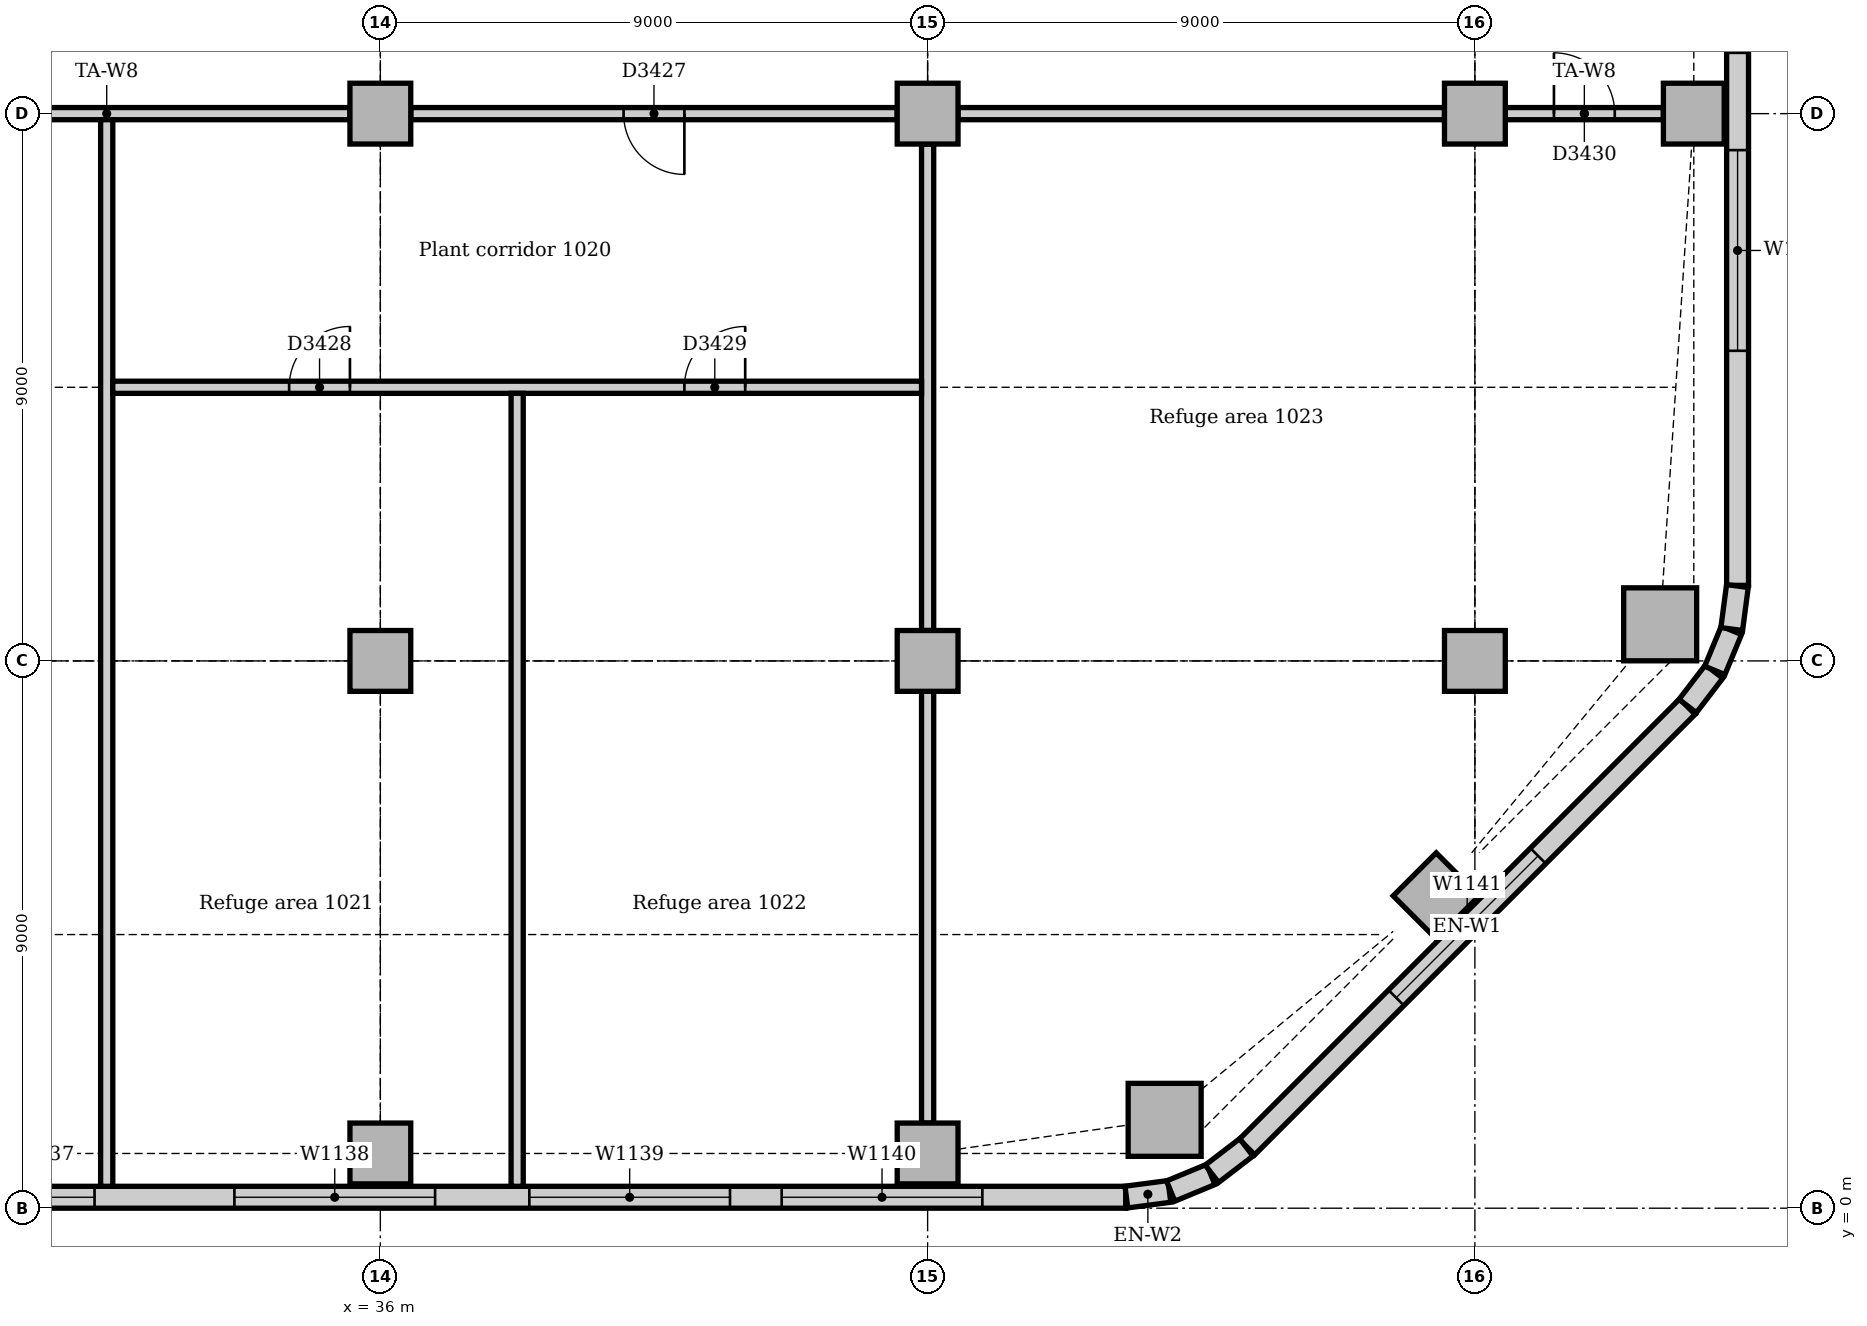
"""IFC4 building model, lengths in metres.
Left out: names, types, materials, properties, quantities, classifications, styles, units other than length and angle.
Written with IfcOpenShell. Run it as: python <this file> out.ifc"""

import sys

from ifc_helpers import new_model, si_unit, direction, frame, frame_2d, origin, origin_2d, place, context, subcontext, project, spatial, rectangle, extrude, element, fill, save


model = new_model("IFC4")
c1 = context("Model", 3, precision=1e-05, world=origin(), true_north=direction((0.0, 1.0)))
c2 = subcontext(c1, "Body", "Model", "MODEL_VIEW")
j1 = project(units=[si_unit("LENGTHUNIT", "METRE"), si_unit("PLANEANGLEUNIT", "RADIAN")], contexts=[c1])
p1 = place(None, origin())
s1 = spatial("IfcSite", under=j1, at=p1, CompositionType="ELEMENT")
p2 = place(p1, origin())
s2 = spatial("IfcBuilding", under=s1, at=p2, CompositionType="ELEMENT")
p3 = place(p2, frame((0.0, 0.0, 46.0)))
s3 = spatial("IfcBuildingStorey", under=s2, at=p3, CompositionType="ELEMENT", Elevation=46.0)
for number, where, z_axis, x_axis in (
    (1, (48.898, 1.453, 0.0), (0.0, 0.0, 1.0), (1.0, 0.0, 0.0)),
    (2, (57.047, 9.602, 0.0), (0.0, 0.0, 1.0), (1.0, 0.0, 0.0)),
):
    element("IfcColumn", number, at=place(p3, frame(where, z_axis=z_axis, x_axis=x_axis)), inside=s3, PredefinedType="COLUMN", context=c2, shape_type="SweptSolid", body=[
        extrude(rectangle(XDim=1.2, YDim=1.2, at=origin_2d()), origin(), (0.0, 0.0, 1.0), 4.85),
    ])
for number, where, z_axis, x_axis in (
    (3, (36.0, 0.9, 0.0), (0.0, 0.0, 1.0), (1.0, 0.0, 0.0)),
    (4, (45.0, 0.9, 0.0), (0.0, 0.0, 1.0), (1.0, 0.0, 0.0)),
    (5, (53.364, 5.136, 0.0), (0.0, 0.0, 1.0), (0.707, 0.707, 0.0)),
    (6, (57.6, 18.0, 0.0), (0.0, 0.0, 1.0), (1.0, 0.0, 0.0)),
    (7, (36.0, 9.0, 0.0), (0.0, 0.0, 1.0), (1.0, 0.0, 0.0)),
    (8, (36.0, 18.0, 0.0), (0.0, 0.0, 1.0), (1.0, 0.0, 0.0)),
    (9, (45.0, 9.0, 0.0), (0.0, 0.0, 1.0), (1.0, 0.0, 0.0)),
    (10, (45.0, 18.0, 0.0), (0.0, 0.0, 1.0), (1.0, 0.0, 0.0)),
    (11, (54.0, 9.0, 0.0), (0.0, 0.0, 1.0), (1.0, 0.0, 0.0)),
    (12, (54.0, 18.0, 0.0), (0.0, 0.0, 1.0), (1.0, 0.0, 0.0)),
):
    element("IfcColumn", number, at=place(p3, frame(where, z_axis=z_axis, x_axis=x_axis)), inside=s3, PredefinedType="COLUMN", context=c2, shape_type="SweptSolid", body=[
        extrude(rectangle(XDim=1.0, YDim=1.0, at=origin_2d()), origin(), (0.0, 0.0, 1.0), 4.85),
    ])
p4 = place(p3, frame((4.243, 0.18, 0.0), z_axis=(0.0, 0.0, 1.0), x_axis=(1.0, 0.0, 0.0)))
e13 = element("IfcWall", 13, at=p4, inside=s3, PredefinedType="STANDARD", context=c2, shape_type="SweptSolid", body=[
    extrude(rectangle(XDim=44.015, YDim=0.36, at=frame_2d((22.007, 0.0))), origin(), (0.0, 0.0, 1.0), 4.85),
])
p5 = place(p4, frame((2.439, 0.0, 0.9)))
e14 = element("IfcOpeningElement", 14, at=p5, cuts=e13, PredefinedType="OPENING", context=c2, shape_type="SweptSolid", body=[
    extrude(rectangle(XDim=1.8, YDim=2.2, at=frame_2d((0.9, 1.1))), frame((0.0, 0.19, 0.0), z_axis=(0.0, -1.0, 0.0), x_axis=(1.0, 0.0, 0.0)), (0.0, 0.0, 1.0), 0.38),
])
p6 = place(p4, frame((7.257, 0.0, 0.9)))
e15 = element("IfcOpeningElement", 15, at=p6, cuts=e13, PredefinedType="OPENING", context=c2, shape_type="SweptSolid", body=[
    extrude(rectangle(XDim=1.8, YDim=2.2, at=frame_2d((0.9, 1.1))), frame((0.0, 0.19, 0.0), z_axis=(0.0, -1.0, 0.0), x_axis=(1.0, 0.0, 0.0)), (0.0, 0.0, 1.0), 0.38),
])
p7 = place(p4, frame((11.439, 0.0, 0.9)))
e16 = element("IfcOpeningElement", 16, at=p7, cuts=e13, PredefinedType="OPENING", context=c2, shape_type="SweptSolid", body=[
    extrude(rectangle(XDim=1.8, YDim=2.2, at=frame_2d((0.9, 1.1))), frame((0.0, 0.19, 0.0), z_axis=(0.0, -1.0, 0.0), x_axis=(1.0, 0.0, 0.0)), (0.0, 0.0, 1.0), 0.38),
])
p8 = place(p4, frame((15.857, 0.0, 0.9)))
e17 = element("IfcOpeningElement", 17, at=p8, cuts=e13, PredefinedType="OPENING", context=c2, shape_type="SweptSolid", body=[
    extrude(rectangle(XDim=3.3, YDim=2.2, at=frame_2d((1.65, 1.1))), frame((0.0, 0.19, 0.0), z_axis=(0.0, -1.0, 0.0), x_axis=(1.0, 0.0, 0.0)), (0.0, 0.0, 1.0), 0.38),
])
p9 = place(p4, frame((20.357, 0.0, 0.9)))
e18 = element("IfcOpeningElement", 18, at=p9, cuts=e13, PredefinedType="OPENING", context=c2, shape_type="SweptSolid", body=[
    extrude(rectangle(XDim=3.3, YDim=2.2, at=frame_2d((1.65, 1.1))), frame((0.0, 0.19, 0.0), z_axis=(0.0, -1.0, 0.0), x_axis=(1.0, 0.0, 0.0)), (0.0, 0.0, 1.0), 0.38),
])
p10 = place(p4, frame((25.257, 0.0, 0.9)))
e19 = element("IfcOpeningElement", 19, at=p10, cuts=e13, PredefinedType="OPENING", context=c2, shape_type="SweptSolid", body=[
    extrude(rectangle(XDim=1.8, YDim=2.2, at=frame_2d((0.9, 1.1))), frame((0.0, 0.19, 0.0), z_axis=(0.0, -1.0, 0.0), x_axis=(1.0, 0.0, 0.0)), (0.0, 0.0, 1.0), 0.38),
])
p11 = place(p4, frame((29.357, 0.0, 0.9)))
e20 = element("IfcOpeningElement", 20, at=p11, cuts=e13, PredefinedType="OPENING", context=c2, shape_type="SweptSolid", body=[
    extrude(rectangle(XDim=3.3, YDim=2.2, at=frame_2d((1.65, 1.1))), frame((0.0, 0.19, 0.0), z_axis=(0.0, -1.0, 0.0), x_axis=(1.0, 0.0, 0.0)), (0.0, 0.0, 1.0), 0.38),
])
p12 = place(p4, frame((34.207, 0.0, 0.9)))
e21 = element("IfcOpeningElement", 21, at=p12, cuts=e13, PredefinedType="OPENING", context=c2, shape_type="SweptSolid", body=[
    extrude(rectangle(XDim=3.3, YDim=2.2, at=frame_2d((1.65, 1.1))), frame((0.0, 0.19, 0.0), z_axis=(0.0, -1.0, 0.0), x_axis=(1.0, 0.0, 0.0)), (0.0, 0.0, 1.0), 0.38),
])
p13 = place(p4, frame((38.357, 0.0, 0.9)))
e22 = element("IfcOpeningElement", 22, at=p13, cuts=e13, PredefinedType="OPENING", context=c2, shape_type="SweptSolid", body=[
    extrude(rectangle(XDim=3.3, YDim=2.2, at=frame_2d((1.65, 1.1))), frame((0.0, 0.19, 0.0), z_axis=(0.0, -1.0, 0.0), x_axis=(1.0, 0.0, 0.0)), (0.0, 0.0, 1.0), 0.38),
])
p14 = place(p3, frame((50.251, 1.006, 0.0), z_axis=(0.0, 0.0, 1.0), x_axis=(0.707106781187, 0.707106781187, 0.0)))
e23 = element("IfcWall", 23, at=p14, inside=s3, PredefinedType="STANDARD", context=c2, shape_type="SweptSolid", body=[
    extrude(rectangle(XDim=10.243, YDim=0.36, at=frame_2d((5.121, 0.0))), origin(), (0.0, 0.0, 1.0), 4.85),
])
p15 = place(p14, frame((3.471, 0.0, 0.9)))
e24 = element("IfcOpeningElement", 24, at=p15, cuts=e23, PredefinedType="OPENING", context=c2, shape_type="SweptSolid", body=[
    extrude(rectangle(XDim=3.3, YDim=2.2, at=frame_2d((1.65, 1.1))), frame((0.0, 0.19, 0.0), z_axis=(0.0, -1.0, 0.0), x_axis=(1.0, 0.0, 0.0)), (0.0, 0.0, 1.0), 0.38),
])
p16 = place(p3, frame((58.32, 10.243, 0.0), z_axis=(0.0, 0.0, 1.0), x_axis=(0.0, 1.0, 0.0)))
e25 = element("IfcWall", 25, at=p16, inside=s3, PredefinedType="STANDARD", context=c2, shape_type="SweptSolid", body=[
    extrude(rectangle(XDim=24.515, YDim=0.36, at=frame_2d((12.257, 0.0))), origin(), (0.0, 0.0, 1.0), 4.85),
])
p17 = place(p16, frame((3.857, 0.0, 0.9)))
e26 = element("IfcOpeningElement", 26, at=p17, cuts=e25, PredefinedType="OPENING", context=c2, shape_type="SweptSolid", body=[
    extrude(rectangle(XDim=3.3, YDim=2.2, at=frame_2d((1.65, 1.1))), frame((0.0, 0.19, 0.0), z_axis=(0.0, -1.0, 0.0), x_axis=(1.0, 0.0, 0.0)), (0.0, 0.0, 1.0), 0.38),
])
p18 = place(p16, frame((8.757, 0.0, 0.9)))
e27 = element("IfcOpeningElement", 27, at=p18, cuts=e25, PredefinedType="OPENING", context=c2, shape_type="SweptSolid", body=[
    extrude(rectangle(XDim=1.8, YDim=2.2, at=frame_2d((0.9, 1.1))), frame((0.0, 0.19, 0.0), z_axis=(0.0, -1.0, 0.0), x_axis=(1.0, 0.0, 0.0)), (0.0, 0.0, 1.0), 0.38),
])
p19 = place(p16, frame((12.557, 0.0, 0.9)))
e28 = element("IfcOpeningElement", 28, at=p19, cuts=e25, PredefinedType="OPENING", context=c2, shape_type="SweptSolid", body=[
    extrude(rectangle(XDim=3.3, YDim=2.2, at=frame_2d((1.65, 1.1))), frame((0.0, 0.19, 0.0), z_axis=(0.0, -1.0, 0.0), x_axis=(1.0, 0.0, 0.0)), (0.0, 0.0, 1.0), 0.38),
])
p20 = place(p16, frame((17.357, 0.0, 0.9)))
e29 = element("IfcOpeningElement", 29, at=p20, cuts=e25, PredefinedType="OPENING", context=c2, shape_type="SweptSolid", body=[
    extrude(rectangle(XDim=3.3, YDim=2.2, at=frame_2d((1.65, 1.1))), frame((0.0, 0.19, 0.0), z_axis=(0.0, -1.0, 0.0), x_axis=(1.0, 0.0, 0.0)), (0.0, 0.0, 1.0), 0.38),
])
for number, where, z_axis, x_axis in (
    (30, (48.269, 0.183, 0.0), (0.0, 0.0, 1.0), (0.991, 0.131, 0.0)),
    (31, (48.997, 0.282, 0.0), (0.0, 0.0, 1.0), (0.924, 0.383, 0.0)),
):
    element("IfcWall", number, at=place(p3, frame(where, z_axis=z_axis, x_axis=x_axis)), inside=s3, PredefinedType="STANDARD", context=c2, shape_type="SweptSolid", body=[
        extrude(rectangle(XDim=0.713, YDim=0.36, at=frame_2d((0.356, 0.0))), origin(), (0.0, 0.0, 1.0), 4.85),
    ])
for number, where, z_axis, x_axis in (
    (32, (49.675, 0.566, 0.0), (0.0, 0.0, 1.0), (0.793, 0.609, 0.0)),
    (33, (57.5, 8.259, 0.0), (0.0, 0.0, 1.0), (0.609, 0.793, 0.0)),
):
    element("IfcWall", number, at=place(p3, frame(where, z_axis=z_axis, x_axis=x_axis)), inside=s3, PredefinedType="STANDARD", context=c2, shape_type="SweptSolid", body=[
        extrude(rectangle(XDim=0.713, YDim=0.36, at=frame_2d((0.357, 0.0))), origin(), (0.0, 0.0, 1.0), 4.85),
    ])
for number, where, z_axis, x_axis in (
    (34, (57.945, 8.844, 0.0), (0.0, 0.0, 1.0), (0.383, 0.924, 0.0)),
    (35, (58.224, 9.524, 0.0), (0.0, 0.0, 1.0), (0.131, 0.991, 0.0)),
):
    element("IfcWall", number, at=place(p3, frame(where, z_axis=z_axis, x_axis=x_axis)), inside=s3, PredefinedType="STANDARD", context=c2, shape_type="SweptSolid", body=[
        extrude(rectangle(XDim=0.713, YDim=0.36, at=frame_2d((0.356, 0.0))), origin(), (0.0, 0.0, 1.0), 4.85),
    ])
p21 = place(p3, frame((54.5, 18.0, 0.0), z_axis=(0.0, 0.0, 1.0), x_axis=(1.0, 0.0, 0.0)))
e36 = element("IfcWall", 36, at=p21, inside=s3, PredefinedType="PARTITIONING", context=c2, shape_type="SweptSolid", body=[
    extrude(rectangle(XDim=2.6, YDim=0.2, at=frame_2d((1.3, 0.0))), origin(), (0.0, 0.0, 1.0), 4.602),
])
p22 = place(p21, frame((0.8, 0.0, 0.0)))
e37 = element("IfcOpeningElement", 37, at=p22, cuts=e36, PredefinedType="OPENING", context=c2, shape_type="SweptSolid", body=[
    extrude(rectangle(XDim=1.0, YDim=2.1, at=frame_2d((0.5, 1.05))), frame((0.0, 0.11, 0.0), z_axis=(0.0, -1.0, 0.0), x_axis=(1.0, 0.0, 0.0)), (0.0, 0.0, 1.0), 0.22),
])
p23 = place(p3, frame((45.5, 18.0, 0.0), z_axis=(0.0, 0.0, 1.0), x_axis=(1.0, 0.0, 0.0)))
e38 = element("IfcWall", 38, at=p23, inside=s3, PredefinedType="PARTITIONING", context=c2, shape_type="SweptSolid", body=[
    extrude(rectangle(XDim=8.0, YDim=0.2, at=frame_2d((4.0, 0.0))), origin(), (0.0, 0.0, 1.0), 4.15),
])
p24 = place(p3, frame((36.5, 18.0, 0.0), z_axis=(0.0, 0.0, 1.0), x_axis=(1.0, 0.0, 0.0)))
e39 = element("IfcWall", 39, at=p24, inside=s3, PredefinedType="PARTITIONING", context=c2, shape_type="SweptSolid", body=[
    extrude(rectangle(XDim=8.0, YDim=0.2, at=frame_2d((4.0, 0.0))), origin(), (0.0, 0.0, 1.0), 4.15),
])
p25 = place(p24, frame((3.5, 0.0, 0.0)))
e40 = element("IfcOpeningElement", 40, at=p25, cuts=e39, PredefinedType="OPENING", context=c2, shape_type="SweptSolid", body=[
    extrude(rectangle(XDim=1.0, YDim=2.1, at=frame_2d((0.5, 1.05))), frame((0.0, 0.11, 0.0), z_axis=(0.0, -1.0, 0.0), x_axis=(1.0, 0.0, 0.0)), (0.0, 0.0, 1.0), 0.22),
])
p26 = place(p3, frame((27.5, 18.0, 0.0), z_axis=(0.0, 0.0, 1.0), x_axis=(1.0, 0.0, 0.0)))
e41 = element("IfcWall", 41, at=p26, inside=s3, PredefinedType="PARTITIONING", context=c2, shape_type="SweptSolid", body=[
    extrude(rectangle(XDim=8.0, YDim=0.2, at=frame_2d((4.0, 0.0))), origin(), (0.0, 0.0, 1.0), 4.15),
])
p27 = place(p3, frame((31.5, 0.36, 0.0), z_axis=(0.0, 0.0, 1.0), x_axis=(0.0, 1.0, 0.0)))
e42 = element("IfcWall", 42, at=p27, inside=s3, PredefinedType="PARTITIONING", context=c2, shape_type="SweptSolid", body=[
    extrude(rectangle(XDim=17.54, YDim=0.2, at=frame_2d((8.77, 0.0))), origin(), (0.0, 0.0, 1.0), 4.85),
])
p28 = place(p3, frame((45.0, 1.4, 0.0), z_axis=(0.0, 0.0, 1.0), x_axis=(0.0, 1.0, 0.0)))
e43 = element("IfcWall", 43, at=p28, inside=s3, PredefinedType="PARTITIONING", context=c2, shape_type="SweptSolid", body=[
    extrude(rectangle(XDim=7.1, YDim=0.2, at=frame_2d((3.55, 0.0))), origin(), (0.0, 0.0, 1.0), 4.158),
])
p29 = place(p3, frame((45.0, 9.5, 0.0), z_axis=(0.0, 0.0, 1.0), x_axis=(0.0, 1.0, 0.0)))
e44 = element("IfcWall", 44, at=p29, inside=s3, PredefinedType="PARTITIONING", context=c2, shape_type="SweptSolid", body=[
    extrude(rectangle(XDim=8.0, YDim=0.2, at=frame_2d((4.0, 0.0))), origin(), (0.0, 0.0, 1.0), 4.158),
])
p30 = place(p3, frame((31.6, 13.5, 0.0), z_axis=(0.0, 0.0, 1.0), x_axis=(1.0, 0.0, 0.0)))
e45 = element("IfcWall", 45, at=p30, inside=s3, PredefinedType="PARTITIONING", context=c2, shape_type="SweptSolid", body=[
    extrude(rectangle(XDim=13.3, YDim=0.2, at=frame_2d((6.65, 0.0))), origin(), (0.0, 0.0, 1.0), 4.35),
])
p31 = place(p30, frame((2.9, 0.0, 0.0)))
e46 = element("IfcOpeningElement", 46, at=p31, cuts=e45, PredefinedType="OPENING", context=c2, shape_type="SweptSolid", body=[
    extrude(rectangle(XDim=1.0, YDim=2.1, at=frame_2d((0.5, 1.05))), frame((0.0, 0.11, 0.0), z_axis=(0.0, -1.0, 0.0), x_axis=(1.0, 0.0, 0.0)), (0.0, 0.0, 1.0), 0.22),
])
p32 = place(p30, frame((9.4, 0.0, 0.0)))
e47 = element("IfcOpeningElement", 47, at=p32, cuts=e45, PredefinedType="OPENING", context=c2, shape_type="SweptSolid", body=[
    extrude(rectangle(XDim=1.0, YDim=2.1, at=frame_2d((0.5, 1.05))), frame((0.0, 0.11, 0.0), z_axis=(0.0, -1.0, 0.0), x_axis=(1.0, 0.0, 0.0)), (0.0, 0.0, 1.0), 0.22),
])
p33 = place(p3, frame((38.25, 0.36, 0.0), z_axis=(0.0, 0.0, 1.0), x_axis=(0.0, 1.0, 0.0)))
e48 = element("IfcWall", 48, at=p33, inside=s3, PredefinedType="PARTITIONING", context=c2, shape_type="SweptSolid", body=[
    extrude(rectangle(XDim=13.04, YDim=0.2, at=frame_2d((6.52, 0.0))), origin(), (0.0, 0.0, 1.0), 4.85),
])
p34 = place(p10, origin())
e49 = element("IfcWindow", 49, at=p34, inside=s3, PartitioningType="SINGLE_PANEL", PredefinedType="WINDOW", context=c2, shape_type="SweptSolid", body=[
    extrude(rectangle(XDim=1.8, YDim=2.2, at=frame_2d((0.9, 1.1))), frame((0.0, 0.13, 0.0), z_axis=(0.0, -1.0, 0.0), x_axis=(1.0, 0.0, 0.0)), (0.0, 0.0, 1.0), 0.06),
])
fill(e19, e49)
p35 = place(p11, origin())
e50 = element("IfcWindow", 50, at=p35, inside=s3, PartitioningType="SINGLE_PANEL", PredefinedType="WINDOW", context=c2, shape_type="SweptSolid", body=[
    extrude(rectangle(XDim=3.3, YDim=2.2, at=frame_2d((1.65, 1.1))), frame((0.0, 0.13, 0.0), z_axis=(0.0, -1.0, 0.0), x_axis=(1.0, 0.0, 0.0)), (0.0, 0.0, 1.0), 0.06),
])
fill(e20, e50)
p36 = place(p12, origin())
e51 = element("IfcWindow", 51, at=p36, inside=s3, PartitioningType="SINGLE_PANEL", PredefinedType="WINDOW", context=c2, shape_type="SweptSolid", body=[
    extrude(rectangle(XDim=3.3, YDim=2.2, at=frame_2d((1.65, 1.1))), frame((0.0, 0.13, 0.0), z_axis=(0.0, -1.0, 0.0), x_axis=(1.0, 0.0, 0.0)), (0.0, 0.0, 1.0), 0.06),
])
fill(e21, e51)
p37 = place(p13, origin())
e52 = element("IfcWindow", 52, at=p37, inside=s3, PartitioningType="SINGLE_PANEL", PredefinedType="WINDOW", context=c2, shape_type="SweptSolid", body=[
    extrude(rectangle(XDim=3.3, YDim=2.2, at=frame_2d((1.65, 1.1))), frame((0.0, 0.13, 0.0), z_axis=(0.0, -1.0, 0.0), x_axis=(1.0, 0.0, 0.0)), (0.0, 0.0, 1.0), 0.06),
])
fill(e22, e52)
p38 = place(p15, origin())
e53 = element("IfcWindow", 53, at=p38, inside=s3, PartitioningType="SINGLE_PANEL", PredefinedType="WINDOW", context=c2, shape_type="SweptSolid", body=[
    extrude(rectangle(XDim=3.3, YDim=2.2, at=frame_2d((1.65, 1.1))), frame((0.0, 0.13, 0.0), z_axis=(0.0, -1.0, 0.0), x_axis=(1.0, 0.0, 0.0)), (0.0, 0.0, 1.0), 0.06),
])
fill(e24, e53)
p39 = place(p17, origin())
e54 = element("IfcWindow", 54, at=p39, inside=s3, PartitioningType="SINGLE_PANEL", PredefinedType="WINDOW", context=c2, shape_type="SweptSolid", body=[
    extrude(rectangle(XDim=3.3, YDim=2.2, at=frame_2d((1.65, 1.1))), frame((0.0, 0.13, 0.0), z_axis=(0.0, -1.0, 0.0), x_axis=(1.0, 0.0, 0.0)), (0.0, 0.0, 1.0), 0.06),
])
fill(e26, e54)
p40 = place(p25, frame((1.0, 0.0, 0.0), z_axis=(0.0, 0.0, 1.0), x_axis=(-1.0, 0.0, 0.0)))
e55 = element("IfcDoor", 55, at=p40, inside=s3, OperationType="SINGLE_SWING_LEFT", PredefinedType="DOOR", context=c2, shape_type="SweptSolid", body=[
    extrude(rectangle(XDim=1.0, YDim=2.1, at=frame_2d((0.5, 1.05))), frame((0.0, 0.025, 0.0), z_axis=(0.0, -1.0, 0.0), x_axis=(1.0, 0.0, 0.0)), (0.0, 0.0, 1.0), 0.05),
])
fill(e40, e55)
p41 = place(p31, origin())
e56 = element("IfcDoor", 56, at=p41, inside=s3, OperationType="SINGLE_SWING_RIGHT", PredefinedType="DOOR", context=c2, shape_type="SweptSolid", body=[
    extrude(rectangle(XDim=1.0, YDim=2.1, at=frame_2d((0.5, 1.05))), frame((0.0, 0.025, 0.0), z_axis=(0.0, -1.0, 0.0), x_axis=(1.0, 0.0, 0.0)), (0.0, 0.0, 1.0), 0.05),
])
fill(e46, e56)
p42 = place(p32, origin())
e57 = element("IfcDoor", 57, at=p42, inside=s3, OperationType="SINGLE_SWING_RIGHT", PredefinedType="DOOR", context=c2, shape_type="SweptSolid", body=[
    extrude(rectangle(XDim=1.0, YDim=2.1, at=frame_2d((0.5, 1.05))), frame((0.0, 0.025, 0.0), z_axis=(0.0, -1.0, 0.0), x_axis=(1.0, 0.0, 0.0)), (0.0, 0.0, 1.0), 0.05),
])
fill(e47, e57)
p43 = place(p22, origin())
e58 = element("IfcDoor", 58, at=p43, inside=s3, OperationType="SINGLE_SWING_LEFT", PredefinedType="DOOR", context=c2, shape_type="SweptSolid", body=[
    extrude(rectangle(XDim=1.0, YDim=2.1, at=frame_2d((0.5, 1.05))), frame((0.0, 0.025, 0.0), z_axis=(0.0, -1.0, 0.0), x_axis=(1.0, 0.0, 0.0)), (0.0, 0.0, 1.0), 0.05),
])
fill(e37, e58)
save(model, sys.argv[1])
